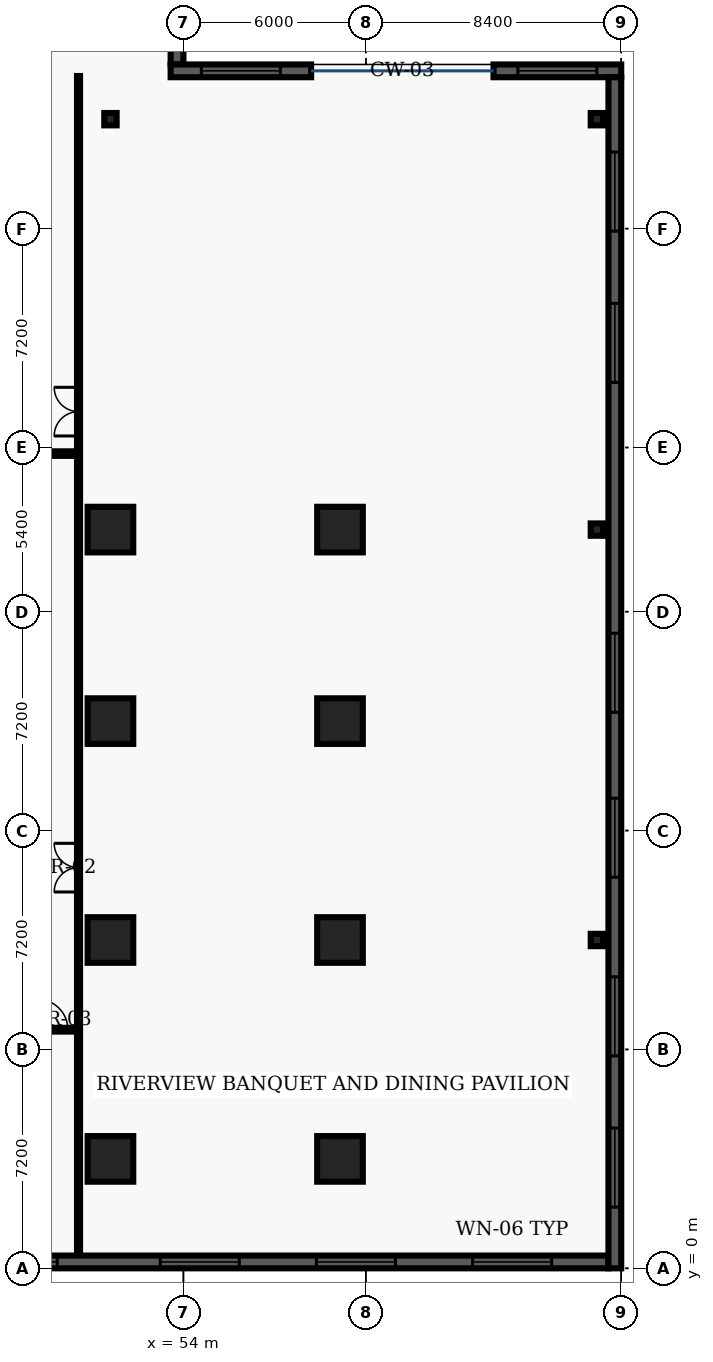
"""IFC4 building model, lengths in metres.
Left out: names, types, materials, properties, quantities, classifications, styles, units other than length and angle.
Written with IfcOpenShell. Run it as: python <this file> out.ifc"""

import sys

from ifc_helpers import new_model, entity, si_unit, converted_unit, direction, frame, origin_with_axes, origin_2d_with_axis, place, context, subcontext, project, spatial, polyline, rectangle, hollow_rectangle, outline, extrude, element, fill, save


model = new_model("IFC4")
c1 = context("Model", 3, precision=1e-05, world=origin_with_axes(), true_north=direction((0.0, 1.0)))
c2 = subcontext(c1, "Body", "Model", "MODEL_VIEW")
j1 = project(units=[si_unit("LENGTHUNIT", "METRE"), converted_unit("PLANEANGLEUNIT", "DEGREE", entity("IfcPlaneAngleMeasure", 0.017), si_unit("PLANEANGLEUNIT", "RADIAN"), dimensions=[0, 0, 0, 0, 0, 0, 0])], contexts=[c1])
p1 = place(None, origin_with_axes())
s1 = spatial("IfcSite", under=j1, at=p1, CompositionType="ELEMENT")
p2 = place(p1, origin_with_axes())
s2 = spatial("IfcBuilding", under=s1, at=p2, CompositionType="ELEMENT")
p3 = place(p2, frame((0.0, 0.0, 15.3), z_axis=(0.0, 0.0, 1.0), x_axis=(1.0, 0.0, 0.0)))
s3 = spatial("IfcBuildingStorey", under=s2, at=p3, CompositionType="ELEMENT", Elevation=15.3)
for number, where, z_axis, x_axis in (
    (1, (51.6, 3.6, 0.0), (0.0, 0.0, 1.0), (1.0, 0.0, 0.0)),
    (2, (51.6, 10.8, 0.0), (0.0, 0.0, 1.0), (1.0, 0.0, 0.0)),
    (3, (51.6, 18.0, 0.0), (0.0, 0.0, 1.0), (1.0, 0.0, 0.0)),
    (4, (51.6, 24.3, 0.0), (0.0, 0.0, 1.0), (1.0, 0.0, 0.0)),
    (5, (59.15, 3.6, 0.0), (0.0, 0.0, 1.0), (1.0, 0.0, 0.0)),
    (6, (59.15, 10.8, 0.0), (0.0, 0.0, 1.0), (1.0, 0.0, 0.0)),
    (7, (59.15, 18.0, 0.0), (0.0, 0.0, 1.0), (1.0, 0.0, 0.0)),
    (8, (59.15, 24.3, 0.0), (0.0, 0.0, 1.0), (1.0, 0.0, 0.0)),
):
    element("IfcColumn", number, at=place(p3, frame(where, z_axis=z_axis, x_axis=x_axis)), inside=s3, PredefinedType="COLUMN", context=c2, shape_type="SweptSolid", body=[
        extrude(rectangle(XDim=1.5, YDim=1.5, at=origin_2d_with_axis()), origin_with_axes(), (0.0, 0.0, 1.0), 4.5),
    ])
for number, where, z_axis, x_axis in (
    (9, (67.6, 10.8, 0.0), (0.0, 0.0, 1.0), (1.0, 0.0, 0.0)),
    (10, (67.6, 24.3, 0.0), (0.0, 0.0, 1.0), (1.0, 0.0, 0.0)),
    (11, (67.6, 37.8, 0.0), (0.0, 0.0, 1.0), (1.0, 0.0, 0.0)),
    (12, (51.6, 37.8, 0.0), (0.0, 0.0, 1.0), (1.0, 0.0, 0.0)),
):
    element("IfcColumn", number, at=place(p3, frame(where, z_axis=z_axis, x_axis=x_axis)), inside=s3, PredefinedType="COLUMN", context=c2, shape_type="SweptSolid", body=[
        extrude(hollow_rectangle(XDim=0.406, YDim=0.406, WallThickness=0.015, InnerFilletRadius=0.015, OuterFilletRadius=0.03, at=origin_2d_with_axis()), origin_with_axes(), (0.0, 0.0, 1.0), 4.392),
    ])
p4 = place(p3, frame((50.55, 0.38, 0.0), z_axis=(0.0, 0.0, 1.0), x_axis=(0.0, 1.0, 0.0)))
e13 = element("IfcWall", 13, at=p4, inside=s3, PredefinedType="PARTITIONING", context=c2, shape_type="SweptSolid", body=[
    extrude(outline(polyline([(0.0, -0.05), (38.84, -0.05), (38.84, 0.05), (0.0, 0.05), (0.0, -0.05)])), origin_with_axes(), (0.0, 0.0, 1.0), 3.2),
])
p5 = place(p4, frame((12.8, 0.0, 0.0), z_axis=(0.0, 0.0, 1.0), x_axis=(1.0, 0.0, 0.0)))
e14 = element("IfcOpeningElement", 14, at=p5, cuts=e13, PredefinedType="OPENING", context=c2, shape_type="SweptSolid", body=[
    extrude(rectangle(XDim=1.6, YDim=0.12, at=origin_2d_with_axis()), origin_with_axes(), (0.0, 0.0, 1.0), 2.2),
])
p6 = place(p4, frame((27.8, 0.0, 0.0), z_axis=(0.0, 0.0, 1.0), x_axis=(1.0, 0.0, 0.0)))
e15 = element("IfcOpeningElement", 15, at=p6, cuts=e13, PredefinedType="OPENING", context=c2, shape_type="SweptSolid", body=[
    extrude(rectangle(XDim=1.6, YDim=0.12, at=origin_2d_with_axis()), origin_with_axes(), (0.0, 0.0, 1.0), 2.2),
])
p7 = place(p3, frame((48.05, 7.85, 0.0), z_axis=(0.0, 0.0, 1.0), x_axis=(1.0, 0.0, 0.0)))
e16 = element("IfcWall", 16, at=p7, inside=s3, PredefinedType="PARTITIONING", context=c2, shape_type="SweptSolid", body=[
    extrude(outline(polyline([(0.0, -0.062), (2.5, -0.062), (2.5, 0.062), (0.0, 0.062), (0.0, -0.062)])), origin_with_axes(), (0.0, 0.0, 1.0), 3.2),
])
p8 = place(p7, frame((1.65, 0.0, 0.0), z_axis=(0.0, 0.0, 1.0), x_axis=(1.0, 0.0, 0.0)))
e17 = element("IfcOpeningElement", 17, at=p8, cuts=e16, PredefinedType="OPENING", context=c2, shape_type="SweptSolid", body=[
    extrude(rectangle(XDim=1.0, YDim=0.145, at=origin_2d_with_axis()), origin_with_axes(), (0.0, 0.0, 1.0), 2.15),
])
p9 = place(p3, frame((21.3, 26.8, 0.0), z_axis=(0.0, 0.0, 1.0), x_axis=(1.0, 0.0, 0.0)))
e18 = element("IfcWall", 18, at=p9, inside=s3, PredefinedType="PARTITIONING", context=c2, shape_type="SweptSolid", body=[
    extrude(outline(polyline([(0.0, -0.075), (29.25, -0.075), (29.25, 0.075), (0.0, 0.075), (0.0, -0.075)])), origin_with_axes(), (0.0, 0.0, 1.0), 3.2),
])
p10 = place(p3, frame((67.98, 0.21, 0.0), z_axis=(0.0, 0.0, 1.0), x_axis=(-1.0, 0.0, 0.0)))
e19 = element("IfcWall", 19, at=p10, inside=s3, PredefinedType="SOLIDWALL", context=c2, shape_type="SweptSolid", body=[
    extrude(outline(polyline([(0.0, -0.21), (67.98, -0.21), (67.98, 0.21), (0.0, 0.21), (0.0, -0.21)])), origin_with_axes(), (0.0, 0.0, 1.0), 4.26),
])
p11 = place(p10, frame((3.168, 0.0, 0.45), z_axis=(0.0, 0.0, 1.0), x_axis=(1.0, 0.0, 0.0)))
e20 = element("IfcOpeningElement", 20, at=p11, cuts=e19, PredefinedType="OPENING", context=c2, shape_type="SweptSolid", body=[
    extrude(rectangle(XDim=2.6, YDim=0.44, at=origin_2d_with_axis()), origin_with_axes(), (0.0, 0.0, 1.0), 2.8),
])
p12 = place(p10, frame((8.305, 0.0, 0.45), z_axis=(0.0, 0.0, 1.0), x_axis=(1.0, 0.0, 0.0)))
e21 = element("IfcOpeningElement", 21, at=p12, cuts=e19, PredefinedType="OPENING", context=c2, shape_type="SweptSolid", body=[
    extrude(rectangle(XDim=2.6, YDim=0.44, at=origin_2d_with_axis()), origin_with_axes(), (0.0, 0.0, 1.0), 2.8),
])
p13 = place(p10, frame((13.442, 0.0, 0.45), z_axis=(0.0, 0.0, 1.0), x_axis=(1.0, 0.0, 0.0)))
e22 = element("IfcOpeningElement", 22, at=p13, cuts=e19, PredefinedType="OPENING", context=c2, shape_type="SweptSolid", body=[
    extrude(rectangle(XDim=2.6, YDim=0.44, at=origin_2d_with_axis()), origin_with_axes(), (0.0, 0.0, 1.0), 2.8),
])
p14 = place(p10, frame((19.429, 0.0, 0.45), z_axis=(0.0, 0.0, 1.0), x_axis=(1.0, 0.0, 0.0)))
e23 = element("IfcOpeningElement", 23, at=p14, cuts=e19, PredefinedType="OPENING", context=c2, shape_type="SweptSolid", body=[
    extrude(rectangle(XDim=2.6, YDim=0.44, at=origin_2d_with_axis()), origin_with_axes(), (0.0, 0.0, 1.0), 2.8),
])
p15 = place(p10, frame((23.716, 0.0, 0.45), z_axis=(0.0, 0.0, 1.0), x_axis=(1.0, 0.0, 0.0)))
e24 = element("IfcOpeningElement", 24, at=p15, cuts=e19, PredefinedType="OPENING", context=c2, shape_type="SweptSolid", body=[
    extrude(rectangle(XDim=2.6, YDim=0.44, at=origin_2d_with_axis()), origin_with_axes(), (0.0, 0.0, 1.0), 2.8),
])
p16 = place(p10, frame((28.853, 0.0, 0.45), z_axis=(0.0, 0.0, 1.0), x_axis=(1.0, 0.0, 0.0)))
e25 = element("IfcOpeningElement", 25, at=p16, cuts=e19, PredefinedType="OPENING", context=c2, shape_type="SweptSolid", body=[
    extrude(rectangle(XDim=2.6, YDim=0.44, at=origin_2d_with_axis()), origin_with_axes(), (0.0, 0.0, 1.0), 2.8),
])
p17 = place(p10, frame((33.99, 0.0, 0.45), z_axis=(0.0, 0.0, 1.0), x_axis=(1.0, 0.0, 0.0)))
e26 = element("IfcOpeningElement", 26, at=p17, cuts=e19, PredefinedType="OPENING", context=c2, shape_type="SweptSolid", body=[
    extrude(rectangle(XDim=2.6, YDim=0.44, at=origin_2d_with_axis()), origin_with_axes(), (0.0, 0.0, 1.0), 2.8),
])
p18 = place(p10, frame((39.127, 0.0, 0.45), z_axis=(0.0, 0.0, 1.0), x_axis=(1.0, 0.0, 0.0)))
e27 = element("IfcOpeningElement", 27, at=p18, cuts=e19, PredefinedType="OPENING", context=c2, shape_type="SweptSolid", body=[
    extrude(rectangle(XDim=2.6, YDim=0.44, at=origin_2d_with_axis()), origin_with_axes(), (0.0, 0.0, 1.0), 2.8),
])
p19 = place(p10, frame((44.264, 0.0, 0.45), z_axis=(0.0, 0.0, 1.0), x_axis=(1.0, 0.0, 0.0)))
e28 = element("IfcOpeningElement", 28, at=p19, cuts=e19, PredefinedType="OPENING", context=c2, shape_type="SweptSolid", body=[
    extrude(rectangle(XDim=2.6, YDim=0.44, at=origin_2d_with_axis()), origin_with_axes(), (0.0, 0.0, 1.0), 2.8),
])
p20 = place(p10, frame((49.401, 0.0, 0.45), z_axis=(0.0, 0.0, 1.0), x_axis=(1.0, 0.0, 0.0)))
e29 = element("IfcOpeningElement", 29, at=p20, cuts=e19, PredefinedType="OPENING", context=c2, shape_type="SweptSolid", body=[
    extrude(rectangle(XDim=2.6, YDim=0.44, at=origin_2d_with_axis()), origin_with_axes(), (0.0, 0.0, 1.0), 2.8),
])
p21 = place(p10, frame((54.538, 0.0, 0.45), z_axis=(0.0, 0.0, 1.0), x_axis=(1.0, 0.0, 0.0)))
e30 = element("IfcOpeningElement", 30, at=p21, cuts=e19, PredefinedType="OPENING", context=c2, shape_type="SweptSolid", body=[
    extrude(rectangle(XDim=2.6, YDim=0.44, at=origin_2d_with_axis()), origin_with_axes(), (0.0, 0.0, 1.0), 2.8),
])
p22 = place(p10, frame((59.675, 0.0, 0.45), z_axis=(0.0, 0.0, 1.0), x_axis=(1.0, 0.0, 0.0)))
e31 = element("IfcOpeningElement", 31, at=p22, cuts=e19, PredefinedType="OPENING", context=c2, shape_type="SweptSolid", body=[
    extrude(rectangle(XDim=2.6, YDim=0.44, at=origin_2d_with_axis()), origin_with_axes(), (0.0, 0.0, 1.0), 2.8),
])
p23 = place(p10, frame((64.812, 0.0, 0.45), z_axis=(0.0, 0.0, 1.0), x_axis=(1.0, 0.0, 0.0)))
e32 = element("IfcOpeningElement", 32, at=p23, cuts=e19, PredefinedType="OPENING", context=c2, shape_type="SweptSolid", body=[
    extrude(rectangle(XDim=2.6, YDim=0.44, at=origin_2d_with_axis()), origin_with_axes(), (0.0, 0.0, 1.0), 2.8),
])
p24 = place(p3, frame((53.79, 41.55, 0.0), z_axis=(0.0, 0.0, 1.0), x_axis=(0.0, -1.0, 0.0)))
e33 = element("IfcWall", 33, at=p24, inside=s3, PredefinedType="SOLIDWALL", context=c2, shape_type="SweptSolid", body=[
    extrude(outline(polyline([(0.0, -0.21), (1.95, -0.21), (1.95, 0.21), (0.0, 0.21), (0.0, -0.21)])), origin_with_axes(), (0.0, 0.0, 1.0), 4.26),
])
p25 = place(p3, frame((53.58, 39.39, 0.0), z_axis=(0.0, 0.0, 1.0), x_axis=(1.0, 0.0, 0.0)))
e34 = element("IfcWall", 34, at=p25, inside=s3, PredefinedType="SOLIDWALL", context=c2, shape_type="SweptSolid", body=[
    extrude(outline(polyline([(0.0, -0.21), (4.62, -0.21), (4.62, 0.21), (0.0, 0.21), (0.0, -0.21)])), origin_with_axes(), (0.0, 0.0, 1.0), 4.26),
])
p26 = place(p25, frame((2.31, 0.0, 0.45), z_axis=(0.0, 0.0, 1.0), x_axis=(1.0, 0.0, 0.0)))
e35 = element("IfcOpeningElement", 35, at=p26, cuts=e34, PredefinedType="OPENING", context=c2, shape_type="SweptSolid", body=[
    extrude(rectangle(XDim=2.6, YDim=0.44, at=origin_2d_with_axis()), origin_with_axes(), (0.0, 0.0, 1.0), 2.8),
])
p27 = place(p3, frame((64.2, 39.39, 0.0), z_axis=(0.0, 0.0, 1.0), x_axis=(1.0, 0.0, 0.0)))
e36 = element("IfcWall", 36, at=p27, inside=s3, PredefinedType="SOLIDWALL", context=c2, shape_type="SweptSolid", body=[
    extrude(outline(polyline([(0.0, -0.21), (4.2, -0.21), (4.2, 0.21), (0.0, 0.21), (0.0, -0.21)])), origin_with_axes(), (0.0, 0.0, 1.0), 4.26),
])
p28 = place(p27, frame((2.1, 0.0, 0.45), z_axis=(0.0, 0.0, 1.0), x_axis=(1.0, 0.0, 0.0)))
e37 = element("IfcOpeningElement", 37, at=p28, cuts=e36, PredefinedType="OPENING", context=c2, shape_type="SweptSolid", body=[
    extrude(rectangle(XDim=2.6, YDim=0.44, at=origin_2d_with_axis()), origin_with_axes(), (0.0, 0.0, 1.0), 2.8),
])
p29 = place(p3, frame((68.19, 39.18, 0.0), z_axis=(0.0, 0.0, 1.0), x_axis=(0.0, -1.0, 0.0)))
e38 = element("IfcWall", 38, at=p29, inside=s3, PredefinedType="SOLIDWALL", context=c2, shape_type="SweptSolid", body=[
    extrude(outline(polyline([(0.0, -0.21), (39.18, -0.21), (39.18, 0.21), (0.0, 0.21), (0.0, -0.21)])), origin_with_axes(), (0.0, 0.0, 1.0), 4.26),
])
p30 = place(p29, frame((3.763, 0.0, 0.45), z_axis=(0.0, 0.0, 1.0), x_axis=(1.0, 0.0, 0.0)))
e39 = element("IfcOpeningElement", 39, at=p30, cuts=e38, PredefinedType="OPENING", context=c2, shape_type="SweptSolid", body=[
    extrude(rectangle(XDim=2.6, YDim=0.44, at=origin_2d_with_axis()), origin_with_axes(), (0.0, 0.0, 1.0), 2.8),
])
p31 = place(p29, frame((8.739, 0.0, 0.45), z_axis=(0.0, 0.0, 1.0), x_axis=(1.0, 0.0, 0.0)))
e40 = element("IfcOpeningElement", 40, at=p31, cuts=e38, PredefinedType="OPENING", context=c2, shape_type="SweptSolid", body=[
    extrude(rectangle(XDim=2.6, YDim=0.44, at=origin_2d_with_axis()), origin_with_axes(), (0.0, 0.0, 1.0), 2.8),
])
p32 = place(p29, frame((19.59, 0.0, 0.45), z_axis=(0.0, 0.0, 1.0), x_axis=(1.0, 0.0, 0.0)))
e41 = element("IfcOpeningElement", 41, at=p32, cuts=e38, PredefinedType="OPENING", context=c2, shape_type="SweptSolid", body=[
    extrude(rectangle(XDim=2.6, YDim=0.44, at=origin_2d_with_axis()), origin_with_axes(), (0.0, 0.0, 1.0), 2.8),
])
p33 = place(p29, frame((25.016, 0.0, 0.45), z_axis=(0.0, 0.0, 1.0), x_axis=(1.0, 0.0, 0.0)))
e42 = element("IfcOpeningElement", 42, at=p33, cuts=e38, PredefinedType="OPENING", context=c2, shape_type="SweptSolid", body=[
    extrude(rectangle(XDim=2.6, YDim=0.44, at=origin_2d_with_axis()), origin_with_axes(), (0.0, 0.0, 1.0), 2.8),
])
p34 = place(p29, frame((30.891, 0.0, 0.45), z_axis=(0.0, 0.0, 1.0), x_axis=(1.0, 0.0, 0.0)))
e43 = element("IfcOpeningElement", 43, at=p34, cuts=e38, PredefinedType="OPENING", context=c2, shape_type="SweptSolid", body=[
    extrude(rectangle(XDim=2.6, YDim=0.44, at=origin_2d_with_axis()), origin_with_axes(), (0.0, 0.0, 1.0), 2.8),
])
p35 = place(p29, frame((35.867, 0.0, 0.45), z_axis=(0.0, 0.0, 1.0), x_axis=(1.0, 0.0, 0.0)))
e44 = element("IfcOpeningElement", 44, at=p35, cuts=e38, PredefinedType="OPENING", context=c2, shape_type="SweptSolid", body=[
    extrude(rectangle(XDim=2.6, YDim=0.44, at=origin_2d_with_axis()), origin_with_axes(), (0.0, 0.0, 1.0), 2.8),
])
p36 = place(p7, frame((1.65, 0.0, 0.0), z_axis=(0.0, 0.0, 1.0), x_axis=(1.0, 0.0, 0.0)))
e45 = element("IfcDoor", 45, at=p36, inside=s3, OperationType="SINGLE_SWING_LEFT", PredefinedType="DOOR", context=c2, shape_type="SweptSolid", body=[
    extrude(rectangle(XDim=1.0, YDim=0.075, at=origin_2d_with_axis()), origin_with_axes(), (0.0, 0.0, 1.0), 2.15),
])
fill(e17, e45)
p37 = place(p4, frame((12.8, 0.0, 0.0), z_axis=(0.0, 0.0, 1.0), x_axis=(1.0, 0.0, 0.0)))
e46 = element("IfcDoor", 46, at=p37, inside=s3, OperationType="DOUBLE_DOOR_SINGLE_SWING", PredefinedType="DOOR", context=c2, shape_type="SweptSolid", body=[
    extrude(rectangle(XDim=1.6, YDim=0.06, at=origin_2d_with_axis()), origin_with_axes(), (0.0, 0.0, 1.0), 2.2),
])
fill(e14, e46)
p38 = place(p4, frame((27.8, 0.0, 0.0), z_axis=(0.0, 0.0, 1.0), x_axis=(1.0, 0.0, 0.0)))
e47 = element("IfcDoor", 47, at=p38, inside=s3, OperationType="DOUBLE_DOOR_SINGLE_SWING", PredefinedType="DOOR", context=c2, shape_type="SweptSolid", body=[
    extrude(rectangle(XDim=1.6, YDim=0.06, at=origin_2d_with_axis()), origin_with_axes(), (0.0, 0.0, 1.0), 2.2),
])
fill(e15, e47)
p39 = place(p10, frame((3.168, 0.0, 0.45), z_axis=(0.0, 0.0, 1.0), x_axis=(1.0, 0.0, 0.0)))
e48 = element("IfcWindow", 48, at=p39, inside=s3, PredefinedType="WINDOW", context=c2, shape_type="SweptSolid", body=[
    extrude(rectangle(XDim=2.6, YDim=0.09, at=origin_2d_with_axis()), origin_with_axes(), (0.0, 0.0, 1.0), 2.8),
])
fill(e20, e48)
p40 = place(p10, frame((8.305, 0.0, 0.45), z_axis=(0.0, 0.0, 1.0), x_axis=(1.0, 0.0, 0.0)))
e49 = element("IfcWindow", 49, at=p40, inside=s3, PredefinedType="WINDOW", context=c2, shape_type="SweptSolid", body=[
    extrude(rectangle(XDim=2.6, YDim=0.09, at=origin_2d_with_axis()), origin_with_axes(), (0.0, 0.0, 1.0), 2.8),
])
fill(e21, e49)
p41 = place(p10, frame((13.442, 0.0, 0.45), z_axis=(0.0, 0.0, 1.0), x_axis=(1.0, 0.0, 0.0)))
e50 = element("IfcWindow", 50, at=p41, inside=s3, PredefinedType="WINDOW", context=c2, shape_type="SweptSolid", body=[
    extrude(rectangle(XDim=2.6, YDim=0.09, at=origin_2d_with_axis()), origin_with_axes(), (0.0, 0.0, 1.0), 2.8),
])
fill(e22, e50)
p42 = place(p10, frame((19.429, 0.0, 0.45), z_axis=(0.0, 0.0, 1.0), x_axis=(1.0, 0.0, 0.0)))
e51 = element("IfcWindow", 51, at=p42, inside=s3, PredefinedType="WINDOW", context=c2, shape_type="SweptSolid", body=[
    extrude(rectangle(XDim=2.6, YDim=0.09, at=origin_2d_with_axis()), origin_with_axes(), (0.0, 0.0, 1.0), 2.8),
])
fill(e23, e51)
p43 = place(p25, frame((2.31, 0.0, 0.45), z_axis=(0.0, 0.0, 1.0), x_axis=(1.0, 0.0, 0.0)))
e52 = element("IfcWindow", 52, at=p43, inside=s3, PredefinedType="WINDOW", context=c2, shape_type="SweptSolid", body=[
    extrude(rectangle(XDim=2.6, YDim=0.09, at=origin_2d_with_axis()), origin_with_axes(), (0.0, 0.0, 1.0), 2.8),
])
fill(e35, e52)
p44 = place(p27, frame((2.1, 0.0, 0.45), z_axis=(0.0, 0.0, 1.0), x_axis=(1.0, 0.0, 0.0)))
e53 = element("IfcWindow", 53, at=p44, inside=s3, PredefinedType="WINDOW", context=c2, shape_type="SweptSolid", body=[
    extrude(rectangle(XDim=2.6, YDim=0.09, at=origin_2d_with_axis()), origin_with_axes(), (0.0, 0.0, 1.0), 2.8),
])
fill(e37, e53)
p45 = place(p29, frame((3.763, 0.0, 0.45), z_axis=(0.0, 0.0, 1.0), x_axis=(1.0, 0.0, 0.0)))
e54 = element("IfcWindow", 54, at=p45, inside=s3, PredefinedType="WINDOW", context=c2, shape_type="SweptSolid", body=[
    extrude(rectangle(XDim=2.6, YDim=0.09, at=origin_2d_with_axis()), origin_with_axes(), (0.0, 0.0, 1.0), 2.8),
])
fill(e39, e54)
p46 = place(p29, frame((8.739, 0.0, 0.45), z_axis=(0.0, 0.0, 1.0), x_axis=(1.0, 0.0, 0.0)))
e55 = element("IfcWindow", 55, at=p46, inside=s3, PredefinedType="WINDOW", context=c2, shape_type="SweptSolid", body=[
    extrude(rectangle(XDim=2.6, YDim=0.09, at=origin_2d_with_axis()), origin_with_axes(), (0.0, 0.0, 1.0), 2.8),
])
fill(e40, e55)
p47 = place(p29, frame((19.59, 0.0, 0.45), z_axis=(0.0, 0.0, 1.0), x_axis=(1.0, 0.0, 0.0)))
e56 = element("IfcWindow", 56, at=p47, inside=s3, PredefinedType="WINDOW", context=c2, shape_type="SweptSolid", body=[
    extrude(rectangle(XDim=2.6, YDim=0.09, at=origin_2d_with_axis()), origin_with_axes(), (0.0, 0.0, 1.0), 2.8),
])
fill(e41, e56)
p48 = place(p29, frame((25.016, 0.0, 0.45), z_axis=(0.0, 0.0, 1.0), x_axis=(1.0, 0.0, 0.0)))
e57 = element("IfcWindow", 57, at=p48, inside=s3, PredefinedType="WINDOW", context=c2, shape_type="SweptSolid", body=[
    extrude(rectangle(XDim=2.6, YDim=0.09, at=origin_2d_with_axis()), origin_with_axes(), (0.0, 0.0, 1.0), 2.8),
])
fill(e42, e57)
p49 = place(p29, frame((30.891, 0.0, 0.45), z_axis=(0.0, 0.0, 1.0), x_axis=(1.0, 0.0, 0.0)))
e58 = element("IfcWindow", 58, at=p49, inside=s3, PredefinedType="WINDOW", context=c2, shape_type="SweptSolid", body=[
    extrude(rectangle(XDim=2.6, YDim=0.09, at=origin_2d_with_axis()), origin_with_axes(), (0.0, 0.0, 1.0), 2.8),
])
fill(e43, e58)
p50 = place(p29, frame((35.867, 0.0, 0.45), z_axis=(0.0, 0.0, 1.0), x_axis=(1.0, 0.0, 0.0)))
e59 = element("IfcWindow", 59, at=p50, inside=s3, PredefinedType="WINDOW", context=c2, shape_type="SweptSolid", body=[
    extrude(rectangle(XDim=2.6, YDim=0.09, at=origin_2d_with_axis()), origin_with_axes(), (0.0, 0.0, 1.0), 2.8),
])
fill(e44, e59)
save(model, sys.argv[1])
